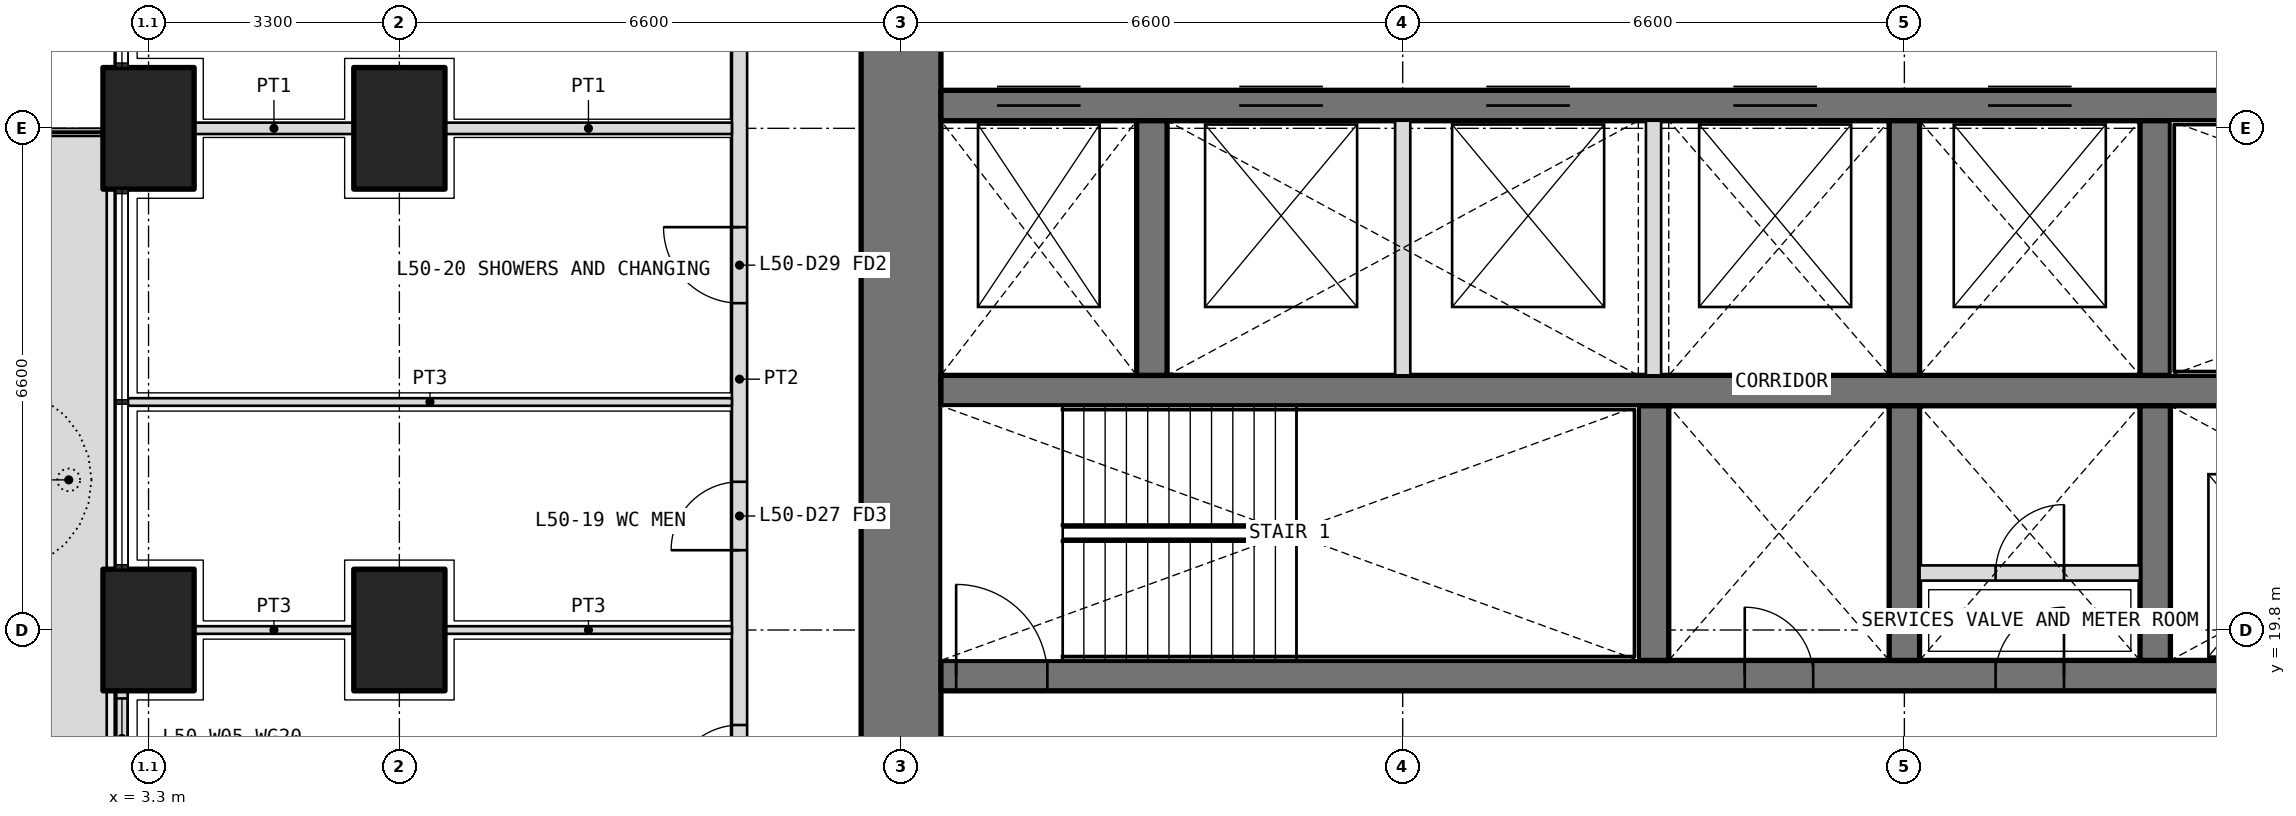
"""IFC4 building model, lengths in metres.
Left out: names, types, materials, properties, quantities, classifications, styles, units other than length and angle.
Written with IfcOpenShell. Run it as: python <this file> out.ifc"""

import sys

from ifc_helpers import new_model, si_unit, direction, frame, frame_2d, origin, origin_2d, place, context, subcontext, project, spatial, polyline, rectangle, outline, extrude, element, fill, save


model = new_model("IFC4")
c1 = context("Model", 3, precision=1e-05, world=origin(), true_north=direction((0.0, 1.0)))
c2 = subcontext(c1, "Body", "Model", "MODEL_VIEW")
j1 = project(units=[si_unit("LENGTHUNIT", "METRE"), si_unit("PLANEANGLEUNIT", "RADIAN")], contexts=[c1])
p1 = place(None, origin())
s1 = spatial("IfcSite", under=j1, at=p1, CompositionType="ELEMENT")
p2 = place(p1, origin())
s2 = spatial("IfcBuilding", under=s1, at=p2, CompositionType="ELEMENT")
p3 = place(p2, frame((0.0, 0.0, 218.7)))
s3 = spatial("IfcBuildingStorey", under=s2, at=p3, CompositionType="ELEMENT", Elevation=218.7)
for number, where, z_axis, x_axis in (
    (1, (3.3, 19.8, 0.0), (0.0, 0.0, 1.0), (0.0, 1.0, 0.0)),
    (2, (3.3, 26.4, 0.0), (0.0, 0.0, 1.0), (0.0, 1.0, 0.0)),
    (3, (6.6, 19.8, 0.0), (0.0, 0.0, 1.0), (0.0, 1.0, 0.0)),
    (4, (6.6, 26.4, 0.0), (0.0, 0.0, 1.0), (0.0, 1.0, 0.0)),
):
    element("IfcColumn", number, at=place(p3, frame(where, z_axis=z_axis, x_axis=x_axis)), inside=s3, PredefinedType="COLUMN", context=c2, shape_type="SweptSolid", body=[
        extrude(rectangle(XDim=1.6, YDim=1.2, at=origin_2d()), origin(), (0.0, 0.0, 1.0), 4.2),
    ])
p4 = place(p3, origin())
e5 = element("IfcWall", 5, at=p4, inside=s3, PredefinedType="USERDEFINED", context=c2, shape_type="SweptSolid", body=[
    extrude(outline(polyline([(1.75, 17.25), (2.75, 17.25), (2.75, 26.3), (1.75, 26.3), (1.75, 17.25)]), holes=[polyline([(1.9, 17.4), (2.6, 17.4), (2.6, 26.15), (1.9, 26.15), (1.9, 17.4)])]), origin(), (0.0, 0.0, 1.0), 1.05),
])
p5 = place(p3, frame((2.95, 19.0, 0.0), z_axis=(0.0, 0.0, 1.0), x_axis=(0.0, -1.0, 0.0)))
e6 = element("IfcWall", 6, at=p5, inside=s3, PredefinedType="SOLIDWALL", context=c2, shape_type="SweptSolid", body=[
    extrude(rectangle(XDim=5.0, YDim=0.15, at=frame_2d((2.5, 0.0))), origin(), (0.0, 0.0, 1.0), 2.05),
])
p6 = place(p5, frame((1.25, 0.0, 0.0)))
e7 = element("IfcOpeningElement", 7, at=p6, cuts=e6, PredefinedType="OPENING", context=c2, shape_type="SweptSolid", body=[
    extrude(rectangle(XDim=1.0, YDim=2.0, at=frame_2d((0.5, 1.0))), frame((0.0, 0.085, 0.0), z_axis=(0.0, -1.0, 0.0), x_axis=(1.0, 0.0, 0.0)), (0.0, 0.0, 1.0), 0.17),
])
p7 = place(p5, frame((0.1, 0.0, 0.1)))
e8 = element("IfcOpeningElement", 8, at=p7, cuts=e6, PredefinedType="OPENING", context=c2, shape_type="SweptSolid", body=[
    extrude(rectangle(XDim=1.05, YDim=1.65, at=frame_2d((0.525, 0.825))), frame((0.0, 0.085, 0.0), z_axis=(0.0, -1.0, 0.0), x_axis=(1.0, 0.0, 0.0)), (0.0, 0.0, 1.0), 0.17),
])
p8 = place(p5, frame((2.75, 0.0, 0.1)))
e9 = element("IfcOpeningElement", 9, at=p8, cuts=e6, PredefinedType="OPENING", context=c2, shape_type="SweptSolid", body=[
    extrude(rectangle(XDim=2.15, YDim=1.65, at=frame_2d((1.075, 0.825))), frame((0.0, 0.085, 0.0), z_axis=(0.0, -1.0, 0.0), x_axis=(1.0, 0.0, 0.0)), (0.0, 0.0, 1.0), 0.17),
])
p9 = place(p3, frame((13.2, 32.475, 0.0), z_axis=(0.0, 0.0, 1.0), x_axis=(0.0, -1.0, 0.0)))
e10 = element("IfcWall", 10, at=p9, inside=s3, PredefinedType="SHEAR", context=c2, shape_type="SweptSolid", body=[
    extrude(rectangle(XDim=18.75, YDim=1.05, at=frame_2d((9.375, 0.0))), origin(), (0.0, 0.0, 1.0), 4.2),
])
p10 = place(p9, frame((14.125, 0.0, 0.0)))
e11 = element("IfcOpeningElement", 11, at=p10, cuts=e10, PredefinedType="OPENING", context=c2, shape_type="SweptSolid", body=[
    extrude(rectangle(XDim=1.6, YDim=2.1, at=frame_2d((0.8, 1.05))), frame((0.0, 0.535, 0.0), z_axis=(0.0, -1.0, 0.0), x_axis=(1.0, 0.0, 0.0)), (0.0, 0.0, 1.0), 1.07),
])
p11 = place(p9, frame((3.325, 0.0, 0.0)))
e12 = element("IfcOpeningElement", 12, at=p11, cuts=e10, PredefinedType="OPENING", context=c2, shape_type="SweptSolid", body=[
    extrude(rectangle(XDim=1.6, YDim=2.1, at=frame_2d((0.8, 1.05))), frame((0.0, 0.535, 0.0), z_axis=(0.0, -1.0, 0.0), x_axis=(1.0, 0.0, 0.0)), (0.0, 0.0, 1.0), 1.07),
])
p12 = place(p3, frame((13.725, 19.2, 0.0), z_axis=(0.0, 0.0, 1.0), x_axis=(1.0, 0.0, 0.0)))
e13 = element("IfcWall", 13, at=p12, inside=s3, PredefinedType="SHEAR", context=c2, shape_type="SweptSolid", body=[
    extrude(rectangle(XDim=25.35, YDim=0.4, at=frame_2d((12.675, 0.0))), origin(), (0.0, 0.0, 1.0), 4.2),
])
p13 = place(p12, frame((10.575, 0.0, 0.0)))
e14 = element("IfcOpeningElement", 14, at=p13, cuts=e13, PredefinedType="OPENING", context=c2, shape_type="SweptSolid", body=[
    extrude(rectangle(XDim=0.9, YDim=2.1, at=frame_2d((0.45, 1.05))), frame((0.0, 0.21, 0.0), z_axis=(0.0, -1.0, 0.0), x_axis=(1.0, 0.0, 0.0)), (0.0, 0.0, 1.0), 0.42),
])
p14 = place(p12, frame((13.875, 0.0, 0.0)))
e15 = element("IfcOpeningElement", 15, at=p14, cuts=e13, PredefinedType="OPENING", context=c2, shape_type="SweptSolid", body=[
    extrude(rectangle(XDim=0.9, YDim=2.1, at=frame_2d((0.45, 1.05))), frame((0.0, 0.21, 0.0), z_axis=(0.0, -1.0, 0.0), x_axis=(1.0, 0.0, 0.0)), (0.0, 0.0, 1.0), 0.42),
])
p15 = place(p12, frame((0.2, 0.0, 0.0)))
e16 = element("IfcOpeningElement", 16, at=p15, cuts=e13, PredefinedType="OPENING", context=c2, shape_type="SweptSolid", body=[
    extrude(rectangle(XDim=1.2, YDim=2.1, at=frame_2d((0.6, 1.05))), frame((0.0, 0.21, 0.0), z_axis=(0.0, -1.0, 0.0), x_axis=(1.0, 0.0, 0.0)), (0.0, 0.0, 1.0), 0.42),
])
p16 = place(p12, frame((23.512, 0.0, 0.0)))
e17 = element("IfcOpeningElement", 17, at=p16, cuts=e13, PredefinedType="OPENING", context=c2, shape_type="SweptSolid", body=[
    extrude(rectangle(XDim=1.1, YDim=2.1, at=frame_2d((0.55, 1.05))), frame((0.0, 0.21, 0.0), z_axis=(0.0, -1.0, 0.0), x_axis=(1.0, 0.0, 0.0)), (0.0, 0.0, 1.0), 0.42),
])
p17 = place(p12, frame((17.125, 0.0, 0.0)))
e18 = element("IfcOpeningElement", 18, at=p17, cuts=e13, PredefinedType="OPENING", context=c2, shape_type="SweptSolid", body=[
    extrude(rectangle(XDim=1.1, YDim=2.1, at=frame_2d((0.55, 1.05))), frame((0.0, 0.21, 0.0), z_axis=(0.0, -1.0, 0.0), x_axis=(1.0, 0.0, 0.0)), (0.0, 0.0, 1.0), 0.42),
])
p18 = place(p12, frame((20.325, 0.0, 0.0)))
e19 = element("IfcOpeningElement", 19, at=p18, cuts=e13, PredefinedType="OPENING", context=c2, shape_type="SweptSolid", body=[
    extrude(rectangle(XDim=1.1, YDim=2.1, at=frame_2d((0.55, 1.05))), frame((0.0, 0.21, 0.0), z_axis=(0.0, -1.0, 0.0), x_axis=(1.0, 0.0, 0.0)), (0.0, 0.0, 1.0), 0.42),
])
p19 = place(p3, frame((13.725, 22.95, 0.0), z_axis=(0.0, 0.0, 1.0), x_axis=(1.0, 0.0, 0.0)))
e20 = element("IfcWall", 20, at=p19, inside=s3, PredefinedType="SHEAR", context=c2, shape_type="SweptSolid", body=[
    extrude(rectangle(XDim=25.35, YDim=0.4, at=frame_2d((12.675, 0.0))), origin(), (0.0, 0.0, 1.0), 4.2),
])
p20 = place(p3, frame((13.725, 26.7, 0.0), z_axis=(0.0, 0.0, 1.0), x_axis=(1.0, 0.0, 0.0)))
e21 = element("IfcWall", 21, at=p20, inside=s3, PredefinedType="SHEAR", context=c2, shape_type="SweptSolid", body=[
    extrude(rectangle(XDim=25.35, YDim=0.4, at=frame_2d((12.675, 0.0))), origin(), (0.0, 0.0, 1.0), 4.2),
])
p21 = place(p20, frame((23.95, 0.0, 0.0)))
e22 = element("IfcOpeningElement", 22, at=p21, cuts=e21, PredefinedType="OPENING", context=c2, shape_type="SweptSolid", body=[
    extrude(rectangle(XDim=1.2, YDim=2.1, at=frame_2d((0.6, 1.05))), frame((0.0, 0.21, 0.0), z_axis=(0.0, -1.0, 0.0), x_axis=(1.0, 0.0, 0.0)), (0.0, 0.0, 1.0), 0.42),
])
p22 = place(p20, frame((0.738, 0.0, 0.0)))
e23 = element("IfcOpeningElement", 23, at=p22, cuts=e21, PredefinedType="OPENING", context=c2, shape_type="SweptSolid", body=[
    extrude(rectangle(XDim=1.1, YDim=2.1, at=frame_2d((0.55, 1.05))), frame((0.0, 0.21, 0.0), z_axis=(0.0, -1.0, 0.0), x_axis=(1.0, 0.0, 0.0)), (0.0, 0.0, 1.0), 0.42),
])
p23 = place(p20, frame((3.925, 0.0, 0.0)))
e24 = element("IfcOpeningElement", 24, at=p23, cuts=e21, PredefinedType="OPENING", context=c2, shape_type="SweptSolid", body=[
    extrude(rectangle(XDim=1.1, YDim=2.1, at=frame_2d((0.55, 1.05))), frame((0.0, 0.21, 0.0), z_axis=(0.0, -1.0, 0.0), x_axis=(1.0, 0.0, 0.0)), (0.0, 0.0, 1.0), 0.42),
])
p24 = place(p20, frame((7.175, 0.0, 0.0)))
e25 = element("IfcOpeningElement", 25, at=p24, cuts=e21, PredefinedType="OPENING", context=c2, shape_type="SweptSolid", body=[
    extrude(rectangle(XDim=1.1, YDim=2.1, at=frame_2d((0.55, 1.05))), frame((0.0, 0.21, 0.0), z_axis=(0.0, -1.0, 0.0), x_axis=(1.0, 0.0, 0.0)), (0.0, 0.0, 1.0), 0.42),
])
p25 = place(p20, frame((10.425, 0.0, 0.0)))
e26 = element("IfcOpeningElement", 26, at=p25, cuts=e21, PredefinedType="OPENING", context=c2, shape_type="SweptSolid", body=[
    extrude(rectangle(XDim=1.1, YDim=2.1, at=frame_2d((0.55, 1.05))), frame((0.0, 0.21, 0.0), z_axis=(0.0, -1.0, 0.0), x_axis=(1.0, 0.0, 0.0)), (0.0, 0.0, 1.0), 0.42),
])
p26 = place(p20, frame((13.775, 0.0, 0.0)))
e27 = element("IfcOpeningElement", 27, at=p26, cuts=e21, PredefinedType="OPENING", context=c2, shape_type="SweptSolid", body=[
    extrude(rectangle(XDim=1.1, YDim=2.1, at=frame_2d((0.55, 1.05))), frame((0.0, 0.21, 0.0), z_axis=(0.0, -1.0, 0.0), x_axis=(1.0, 0.0, 0.0)), (0.0, 0.0, 1.0), 0.42),
])
for number, where, z_axis, x_axis in (
    (28, (23.1, 19.4, 0.0), (0.0, 0.0, 1.0), (0.0, 1.0, 0.0)),
    (29, (26.4, 19.4, 0.0), (0.0, 0.0, 1.0), (0.0, 1.0, 0.0)),
    (30, (29.7, 19.4, 0.0), (0.0, 0.0, 1.0), (0.0, 1.0, 0.0)),
    (31, (16.5, 23.15, 0.0), (0.0, 0.0, 1.0), (0.0, 1.0, 0.0)),
    (32, (26.4, 23.15, 0.0), (0.0, 0.0, 1.0), (0.0, 1.0, 0.0)),
    (33, (29.7, 23.15, 0.0), (0.0, 0.0, 1.0), (0.0, 1.0, 0.0)),
):
    element("IfcWall", number, at=place(p3, frame(where, z_axis=z_axis, x_axis=x_axis)), inside=s3, PredefinedType="SHEAR", context=c2, shape_type="SweptSolid", body=[
        extrude(rectangle(XDim=3.35, YDim=0.4, at=frame_2d((1.675, 0.0))), origin(), (0.0, 0.0, 1.0), 4.2),
    ])
for number, where, z_axis, x_axis in (
    (34, (19.8, 23.15, 0.0), (0.0, 0.0, 1.0), (0.0, 1.0, 0.0)),
    (35, (23.1, 23.15, 0.0), (0.0, 0.0, 1.0), (0.0, 1.0, 0.0)),
):
    element("IfcWall", number, at=place(p3, frame(where, z_axis=z_axis, x_axis=x_axis)), inside=s3, PredefinedType="PARTITIONING", context=c2, shape_type="SweptSolid", body=[
        extrude(rectangle(XDim=3.35, YDim=0.2, at=frame_2d((1.675, 0.0))), origin(), (0.0, 0.0, 1.0), 4.2),
    ])
p27 = place(p3, frame((11.075, 11.175, 0.0), z_axis=(0.0, 0.0, 1.0), x_axis=(0.0, 1.0, 0.0)))
e36 = element("IfcWall", 36, at=p27, inside=s3, PredefinedType="PARTITIONING", context=c2, shape_type="SweptSolid", body=[
    extrude(rectangle(XDim=23.85, YDim=0.2, at=frame_2d((11.925, 0.0))), origin(), (0.0, 0.0, 1.0), 2.55),
])
p28 = place(p27, frame((0.462, 0.0, 0.0)))
e37 = element("IfcOpeningElement", 37, at=p28, cuts=e36, PredefinedType="OPENING", context=c2, shape_type="SweptSolid", body=[
    extrude(rectangle(XDim=1.0, YDim=2.1, at=frame_2d((0.5, 1.05))), frame((0.0, 0.11, 0.0), z_axis=(0.0, -1.0, 0.0), x_axis=(1.0, 0.0, 0.0)), (0.0, 0.0, 1.0), 0.22),
])
p29 = place(p27, frame((3.125, 0.0, 0.0)))
e38 = element("IfcOpeningElement", 38, at=p29, cuts=e36, PredefinedType="OPENING", context=c2, shape_type="SweptSolid", body=[
    extrude(rectangle(XDim=1.0, YDim=2.1, at=frame_2d((0.5, 1.05))), frame((0.0, 0.11, 0.0), z_axis=(0.0, -1.0, 0.0), x_axis=(1.0, 0.0, 0.0)), (0.0, 0.0, 1.0), 0.22),
])
p30 = place(p27, frame((6.475, 0.0, 0.0)))
e39 = element("IfcOpeningElement", 39, at=p30, cuts=e36, PredefinedType="OPENING", context=c2, shape_type="SweptSolid", body=[
    extrude(rectangle(XDim=0.9, YDim=2.1, at=frame_2d((0.45, 1.05))), frame((0.0, 0.11, 0.0), z_axis=(0.0, -1.0, 0.0), x_axis=(1.0, 0.0, 0.0)), (0.0, 0.0, 1.0), 0.22),
])
p31 = place(p27, frame((9.675, 0.0, 0.0)))
e40 = element("IfcOpeningElement", 40, at=p31, cuts=e36, PredefinedType="OPENING", context=c2, shape_type="SweptSolid", body=[
    extrude(rectangle(XDim=0.9, YDim=2.1, at=frame_2d((0.45, 1.05))), frame((0.0, 0.11, 0.0), z_axis=(0.0, -1.0, 0.0), x_axis=(1.0, 0.0, 0.0)), (0.0, 0.0, 1.0), 0.22),
])
p32 = place(p27, frame((12.925, 0.0, 0.0)))
e41 = element("IfcOpeningElement", 41, at=p32, cuts=e36, PredefinedType="OPENING", context=c2, shape_type="SweptSolid", body=[
    extrude(rectangle(XDim=1.0, YDim=2.1, at=frame_2d((0.5, 1.05))), frame((0.0, 0.11, 0.0), z_axis=(0.0, -1.0, 0.0), x_axis=(1.0, 0.0, 0.0)), (0.0, 0.0, 1.0), 0.22),
])
p33 = place(p27, frame((19.087, 0.0, 0.0)))
e42 = element("IfcOpeningElement", 42, at=p33, cuts=e36, PredefinedType="OPENING", context=c2, shape_type="SweptSolid", body=[
    extrude(rectangle(XDim=1.0, YDim=2.1, at=frame_2d((0.5, 1.05))), frame((0.0, 0.11, 0.0), z_axis=(0.0, -1.0, 0.0), x_axis=(1.0, 0.0, 0.0)), (0.0, 0.0, 1.0), 0.22),
])
p34 = place(p3, frame((3.9, 19.8, 0.0), z_axis=(0.0, 0.0, 1.0), x_axis=(1.0, 0.0, 0.0)))
e43 = element("IfcWall", 43, at=p34, inside=s3, PredefinedType="PARTITIONING", context=c2, shape_type="SweptSolid", body=[
    extrude(rectangle(XDim=2.1, YDim=0.1, at=frame_2d((1.05, 0.0))), origin(), (0.0, 0.0, 1.0), 2.55),
])
p35 = place(p3, frame((7.2, 19.8, 0.0), z_axis=(0.0, 0.0, 1.0), x_axis=(1.0, 0.0, 0.0)))
e44 = element("IfcWall", 44, at=p35, inside=s3, PredefinedType="PARTITIONING", context=c2, shape_type="SweptSolid", body=[
    extrude(rectangle(XDim=3.775, YDim=0.1, at=frame_2d((1.888, 0.0))), origin(), (0.0, 0.0, 1.0), 2.55),
])
p36 = place(p3, frame((3.03, 22.8, 0.0), z_axis=(0.0, 0.0, 1.0), x_axis=(1.0, 0.0, 0.0)))
e45 = element("IfcWall", 45, at=p36, inside=s3, PredefinedType="PARTITIONING", context=c2, shape_type="SweptSolid", body=[
    extrude(rectangle(XDim=7.945, YDim=0.1, at=frame_2d((3.973, 0.0))), origin(), (0.0, 0.0, 1.0), 3.85),
])
p37 = place(p3, frame((3.9, 26.4, 0.0), z_axis=(0.0, 0.0, 1.0), x_axis=(1.0, 0.0, 0.0)))
e46 = element("IfcWall", 46, at=p37, inside=s3, PredefinedType="PARTITIONING", context=c2, shape_type="SweptSolid", body=[
    extrude(rectangle(XDim=2.1, YDim=0.15, at=frame_2d((1.05, 0.0))), origin(), (0.0, 0.0, 1.0), 2.55),
])
p38 = place(p3, frame((7.2, 26.4, 0.0), z_axis=(0.0, 0.0, 1.0), x_axis=(1.0, 0.0, 0.0)))
e47 = element("IfcWall", 47, at=p38, inside=s3, PredefinedType="PARTITIONING", context=c2, shape_type="SweptSolid", body=[
    extrude(rectangle(XDim=3.775, YDim=0.15, at=frame_2d((1.888, 0.0))), origin(), (0.0, 0.0, 1.0), 2.55),
])
p39 = place(p3, frame((26.6, 20.55, 0.0), z_axis=(0.0, 0.0, 1.0), x_axis=(1.0, 0.0, 0.0)))
e48 = element("IfcWall", 48, at=p39, inside=s3, PredefinedType="PARTITIONING", context=c2, shape_type="SweptSolid", body=[
    extrude(rectangle(XDim=2.9, YDim=0.2, at=frame_2d((1.45, 0.0))), origin(), (0.0, 0.0, 1.0), 3.85),
])
p40 = place(p39, frame((1.0, 0.0, 0.0)))
e49 = element("IfcOpeningElement", 49, at=p40, cuts=e48, PredefinedType="OPENING", context=c2, shape_type="SweptSolid", body=[
    extrude(rectangle(XDim=0.9, YDim=2.1, at=frame_2d((0.45, 1.05))), frame((0.0, 0.11, 0.0), z_axis=(0.0, -1.0, 0.0), x_axis=(1.0, 0.0, 0.0)), (0.0, 0.0, 1.0), 0.22),
])
p41 = place(p7, origin())
e50 = element("IfcWindow", 50, at=p41, inside=s3, PartitioningType="SINGLE_PANEL", PredefinedType="WINDOW", context=c2, shape_type="SweptSolid", body=[
    extrude(rectangle(XDim=1.05, YDim=1.65, at=frame_2d((0.525, 0.825))), frame((0.0, 0.03, 0.0), z_axis=(0.0, -1.0, 0.0), x_axis=(1.0, 0.0, 0.0)), (0.0, 0.0, 1.0), 0.06),
])
fill(e8, e50)
p42 = place(p30, origin())
e51 = element("IfcDoor", 51, at=p42, inside=s3, OperationType="SINGLE_SWING_LEFT", PredefinedType="DOOR", context=c2, shape_type="SweptSolid", body=[
    extrude(rectangle(XDim=0.9, YDim=2.1, at=frame_2d((0.45, 1.05))), frame((0.0, 0.025, 0.0), z_axis=(0.0, -1.0, 0.0), x_axis=(1.0, 0.0, 0.0)), (0.0, 0.0, 1.0), 0.05),
])
fill(e39, e51)
p43 = place(p31, origin())
e52 = element("IfcDoor", 52, at=p43, inside=s3, OperationType="SINGLE_SWING_LEFT", PredefinedType="DOOR", context=c2, shape_type="SweptSolid", body=[
    extrude(rectangle(XDim=0.9, YDim=2.1, at=frame_2d((0.45, 1.05))), frame((0.0, 0.025, 0.0), z_axis=(0.0, -1.0, 0.0), x_axis=(1.0, 0.0, 0.0)), (0.0, 0.0, 1.0), 0.05),
])
fill(e40, e52)
p44 = place(p32, origin())
e53 = element("IfcDoor", 53, at=p44, inside=s3, OperationType="SINGLE_SWING_RIGHT", PredefinedType="DOOR", context=c2, shape_type="SweptSolid", body=[
    extrude(rectangle(XDim=1.0, YDim=2.1, at=frame_2d((0.5, 1.05))), frame((0.0, 0.025, 0.0), z_axis=(0.0, -1.0, 0.0), x_axis=(1.0, 0.0, 0.0)), (0.0, 0.0, 1.0), 0.05),
])
fill(e41, e53)
p45 = place(p13, origin())
e54 = element("IfcDoor", 54, at=p45, inside=s3, OperationType="SINGLE_SWING_LEFT", PredefinedType="DOOR", context=c2, shape_type="SweptSolid", body=[
    extrude(rectangle(XDim=0.9, YDim=2.1, at=frame_2d((0.45, 1.05))), frame((0.0, 0.025, 0.0), z_axis=(0.0, -1.0, 0.0), x_axis=(1.0, 0.0, 0.0)), (0.0, 0.0, 1.0), 0.05),
])
fill(e14, e54)
p46 = place(p14, origin())
e55 = element("IfcDoor", 55, at=p46, inside=s3, OperationType="SINGLE_SWING_RIGHT", PredefinedType="DOOR", context=c2, shape_type="SweptSolid", body=[
    extrude(rectangle(XDim=0.9, YDim=2.1, at=frame_2d((0.45, 1.05))), frame((0.0, 0.025, 0.0), z_axis=(0.0, -1.0, 0.0), x_axis=(1.0, 0.0, 0.0)), (0.0, 0.0, 1.0), 0.05),
])
fill(e15, e55)
p47 = place(p40, origin())
e56 = element("IfcDoor", 56, at=p47, inside=s3, OperationType="SINGLE_SWING_RIGHT", PredefinedType="DOOR", context=c2, shape_type="SweptSolid", body=[
    extrude(rectangle(XDim=0.9, YDim=2.1, at=frame_2d((0.45, 1.05))), frame((0.0, 0.025, 0.0), z_axis=(0.0, -1.0, 0.0), x_axis=(1.0, 0.0, 0.0)), (0.0, 0.0, 1.0), 0.05),
])
fill(e49, e56)
p48 = place(p15, origin())
e57 = element("IfcDoor", 57, at=p48, inside=s3, OperationType="SINGLE_SWING_LEFT", PredefinedType="DOOR", context=c2, shape_type="SweptSolid", body=[
    extrude(rectangle(XDim=1.2, YDim=2.1, at=frame_2d((0.6, 1.05))), frame((0.0, 0.025, 0.0), z_axis=(0.0, -1.0, 0.0), x_axis=(1.0, 0.0, 0.0)), (0.0, 0.0, 1.0), 0.05),
])
fill(e16, e57)
p49 = place(p22, origin())
e58 = element("IfcDoor", 58, at=p49, inside=s3, OperationType="DOUBLE_DOOR_SLIDING", PredefinedType="DOOR", context=c2, shape_type="SweptSolid", body=[
    extrude(rectangle(XDim=1.1, YDim=2.1, at=frame_2d((0.55, 1.05))), frame((0.0, 0.025, 0.0), z_axis=(0.0, -1.0, 0.0), x_axis=(1.0, 0.0, 0.0)), (0.0, 0.0, 1.0), 0.05),
])
fill(e23, e58)
p50 = place(p23, origin())
e59 = element("IfcDoor", 59, at=p50, inside=s3, OperationType="DOUBLE_DOOR_SLIDING", PredefinedType="DOOR", context=c2, shape_type="SweptSolid", body=[
    extrude(rectangle(XDim=1.1, YDim=2.1, at=frame_2d((0.55, 1.05))), frame((0.0, 0.025, 0.0), z_axis=(0.0, -1.0, 0.0), x_axis=(1.0, 0.0, 0.0)), (0.0, 0.0, 1.0), 0.05),
])
fill(e24, e59)
p51 = place(p24, origin())
e60 = element("IfcDoor", 60, at=p51, inside=s3, OperationType="DOUBLE_DOOR_SLIDING", PredefinedType="DOOR", context=c2, shape_type="SweptSolid", body=[
    extrude(rectangle(XDim=1.1, YDim=2.1, at=frame_2d((0.55, 1.05))), frame((0.0, 0.025, 0.0), z_axis=(0.0, -1.0, 0.0), x_axis=(1.0, 0.0, 0.0)), (0.0, 0.0, 1.0), 0.05),
])
fill(e25, e60)
p52 = place(p25, origin())
e61 = element("IfcDoor", 61, at=p52, inside=s3, OperationType="DOUBLE_DOOR_SLIDING", PredefinedType="DOOR", context=c2, shape_type="SweptSolid", body=[
    extrude(rectangle(XDim=1.1, YDim=2.1, at=frame_2d((0.55, 1.05))), frame((0.0, 0.025, 0.0), z_axis=(0.0, -1.0, 0.0), x_axis=(1.0, 0.0, 0.0)), (0.0, 0.0, 1.0), 0.05),
])
fill(e26, e61)
p53 = place(p26, origin())
e62 = element("IfcDoor", 62, at=p53, inside=s3, OperationType="DOUBLE_DOOR_SLIDING", PredefinedType="DOOR", context=c2, shape_type="SweptSolid", body=[
    extrude(rectangle(XDim=1.1, YDim=2.1, at=frame_2d((0.55, 1.05))), frame((0.0, 0.025, 0.0), z_axis=(0.0, -1.0, 0.0), x_axis=(1.0, 0.0, 0.0)), (0.0, 0.0, 1.0), 0.05),
])
fill(e27, e62)
save(model, sys.argv[1])
